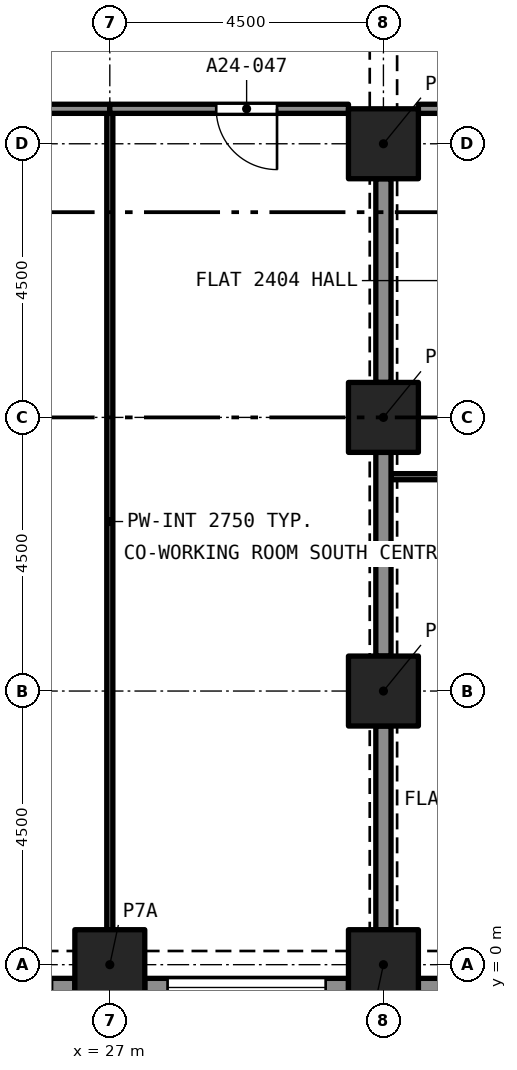
"""IFC4 building model, lengths in metres.
Left out: names, types, materials, properties, quantities, classifications, styles, units other than length and angle.
Written with IfcOpenShell. Run it as: python <this file> out.ifc"""

import sys

from ifc_helpers import new_model, si_unit, direction, frame, frame_2d, origin, origin_2d, place, context, subcontext, project, spatial, rectangle, extrude, element, fill, save


model = new_model("IFC4")
c1 = context("Model", 3, precision=1e-05, world=origin(), true_north=direction((0.0, 1.0)))
c2 = subcontext(c1, "Body", "Model", "MODEL_VIEW")
j1 = project(units=[si_unit("LENGTHUNIT", "METRE"), si_unit("PLANEANGLEUNIT", "RADIAN")], contexts=[c1])
p1 = place(None, origin())
s1 = spatial("IfcSite", under=j1, at=p1, CompositionType="ELEMENT")
p2 = place(p1, origin())
s2 = spatial("IfcBuilding", under=s1, at=p2, CompositionType="ELEMENT")
p3 = place(p2, frame((0.0, 0.0, 89.6)))
s3 = spatial("IfcBuildingStorey", under=s2, at=p3, CompositionType="ELEMENT", Elevation=89.6)
for number, where, z_axis, x_axis in (
    (1, (27.0, 0.0, 0.0), (0.0, 0.0, 1.0), (1.0, 0.0, 0.0)),
    (2, (31.5, 0.0, 0.0), (0.0, 0.0, 1.0), (1.0, 0.0, 0.0)),
    (3, (31.5, 4.5, 0.0), (0.0, 0.0, 1.0), (1.0, 0.0, 0.0)),
    (4, (31.5, 9.0, 0.0), (0.0, 0.0, 1.0), (1.0, 0.0, 0.0)),
    (5, (31.5, 13.5, 0.0), (0.0, 0.0, 1.0), (1.0, 0.0, 0.0)),
):
    element("IfcColumn", number, at=place(p3, frame(where, z_axis=z_axis, x_axis=x_axis)), inside=s3, PredefinedType="COLUMN", context=c2, shape_type="SweptSolid", body=[
        extrude(rectangle(XDim=1.15, YDim=1.15, at=origin_2d()), origin(), (0.0, 0.0, 1.0), 3.2),
    ])
p4 = place(p3, frame((26.425, -0.375, 0.0), z_axis=(0.0, 0.0, 1.0), x_axis=(-1.0, 0.0, 0.0)))
e6 = element("IfcWall", 6, at=p4, inside=s3, PredefinedType="SOLIDWALL", context=c2, shape_type="SweptSolid", body=[
    extrude(rectangle(XDim=3.35, YDim=0.3, at=frame_2d((1.675, 0.0))), origin(), (0.0, 0.0, 1.0), 3.2),
])
p5 = place(p4, frame((0.375, 0.0, 0.45)))
e7 = element("IfcOpeningElement", 7, at=p5, cuts=e6, PredefinedType="OPENING", context=c2, shape_type="SweptSolid", body=[
    extrude(rectangle(XDim=2.6, YDim=1.95, at=frame_2d((1.3, 0.975))), frame((0.0, 0.16, 0.0), z_axis=(0.0, -1.0, 0.0), x_axis=(1.0, 0.0, 0.0)), (0.0, 0.0, 1.0), 0.32),
])
p6 = place(p3, frame((30.925, -0.375, 0.0), z_axis=(0.0, 0.0, 1.0), x_axis=(-1.0, 0.0, 0.0)))
e8 = element("IfcWall", 8, at=p6, inside=s3, PredefinedType="SOLIDWALL", context=c2, shape_type="SweptSolid", body=[
    extrude(rectangle(XDim=3.35, YDim=0.3, at=frame_2d((1.675, 0.0))), origin(), (0.0, 0.0, 1.0), 3.2),
])
p7 = place(p6, frame((0.375, 0.0, 0.45)))
e9 = element("IfcOpeningElement", 9, at=p7, cuts=e8, PredefinedType="OPENING", context=c2, shape_type="SweptSolid", body=[
    extrude(rectangle(XDim=2.6, YDim=1.95, at=frame_2d((1.3, 0.975))), frame((0.0, 0.16, 0.0), z_axis=(0.0, -1.0, 0.0), x_axis=(1.0, 0.0, 0.0)), (0.0, 0.0, 1.0), 0.32),
])
p8 = place(p3, frame((35.425, -0.375, 0.0), z_axis=(0.0, 0.0, 1.0), x_axis=(-1.0, 0.0, 0.0)))
e10 = element("IfcWall", 10, at=p8, inside=s3, PredefinedType="SOLIDWALL", context=c2, shape_type="SweptSolid", body=[
    extrude(rectangle(XDim=3.35, YDim=0.3, at=frame_2d((1.675, 0.0))), origin(), (0.0, 0.0, 1.0), 3.2),
])
p9 = place(p8, frame((0.375, 0.0, 0.45)))
e11 = element("IfcOpeningElement", 11, at=p9, cuts=e10, PredefinedType="OPENING", context=c2, shape_type="SweptSolid", body=[
    extrude(rectangle(XDim=2.6, YDim=1.95, at=frame_2d((1.3, 0.975))), frame((0.0, 0.16, 0.0), z_axis=(0.0, -1.0, 0.0), x_axis=(1.0, 0.0, 0.0)), (0.0, 0.0, 1.0), 0.32),
])
p10 = place(p3, frame((36.0, 8.025, 0.0), z_axis=(0.0, 0.0, 1.0), x_axis=(-1.0, 0.0, 0.0)))
e12 = element("IfcWall", 12, at=p10, inside=s3, PredefinedType="PARTITIONING", context=c2, shape_type="SweptSolid", body=[
    extrude(rectangle(XDim=4.375, YDim=0.1, at=frame_2d((2.188, 0.0))), origin(), (0.0, 0.0, 1.0), 2.9),
])
p11 = place(p10, frame((1.75, 0.0, 0.0)))
e13 = element("IfcOpeningElement", 13, at=p11, cuts=e12, PredefinedType="OPENING", context=c2, shape_type="SweptSolid", body=[
    extrude(rectangle(XDim=1.0, YDim=2.1, at=frame_2d((0.5, 1.05))), frame((0.0, 0.06, 0.0), z_axis=(0.0, -1.0, 0.0), x_axis=(1.0, 0.0, 0.0)), (0.0, 0.0, 1.0), 0.12),
])
p12 = place(p3, frame((31.5, 9.575, 0.0), z_axis=(0.0, 0.0, 1.0), x_axis=(0.0, 1.0, 0.0)))
e14 = element("IfcWall", 14, at=p12, inside=s3, PredefinedType="PARTITIONING", context=c2, shape_type="SweptSolid", body=[
    extrude(rectangle(XDim=3.35, YDim=0.25, at=frame_2d((1.675, 0.0))), origin(), (0.0, 0.0, 1.0), 2.38),
])
p13 = place(p3, frame((34.425, 14.075, 0.0), z_axis=(0.0, 0.0, 1.0), x_axis=(-1.0, 0.0, 0.0)))
e15 = element("IfcWall", 15, at=p13, inside=s3, PredefinedType="PARTITIONING", context=c2, shape_type="SweptSolid", body=[
    extrude(rectangle(XDim=2.35, YDim=0.15, at=frame_2d((1.175, 0.0))), origin(), (0.0, 0.0, 1.0), 2.9),
])
p14 = place(p13, frame((0.175, 0.0, 0.0)))
e16 = element("IfcOpeningElement", 16, at=p14, cuts=e15, PredefinedType="OPENING", context=c2, shape_type="SweptSolid", body=[
    extrude(rectangle(XDim=1.0, YDim=2.1, at=frame_2d((0.5, 1.05))), frame((0.0, 0.085, 0.0), z_axis=(0.0, -1.0, 0.0), x_axis=(1.0, 0.0, 0.0)), (0.0, 0.0, 1.0), 0.17),
])
for number, where, z_axis, x_axis in (
    (17, (31.5, 0.575, 0.0), (0.0, 0.0, 1.0), (0.0, 1.0, 0.0)),
    (18, (31.5, 5.075, 0.0), (0.0, 0.0, 1.0), (0.0, 1.0, 0.0)),
):
    element("IfcWall", number, at=place(p3, frame(where, z_axis=z_axis, x_axis=x_axis)), inside=s3, PredefinedType="PARTITIONING", context=c2, shape_type="SweptSolid", body=[
        extrude(rectangle(XDim=3.35, YDim=0.25, at=frame_2d((1.675, 0.0))), origin(), (0.0, 0.0, 1.0), 2.38),
    ])
p15 = place(p3, frame((27.0, 0.575, 0.0), z_axis=(0.0, 0.0, 1.0), x_axis=(0.0, 1.0, 0.0)))
e19 = element("IfcWall", 19, at=p15, inside=s3, PredefinedType="PARTITIONING", context=c2, shape_type="SweptSolid", body=[
    extrude(rectangle(XDim=13.425, YDim=0.1, at=frame_2d((6.712, 0.0))), origin(), (0.0, 0.0, 1.0), 2.75),
])
p16 = place(p3, frame((27.0, 14.075, 0.0), z_axis=(0.0, 0.0, 1.0), x_axis=(-1.0, 0.0, 0.0)))
e20 = element("IfcWall", 20, at=p16, inside=s3, PredefinedType="PARTITIONING", context=c2, shape_type="SweptSolid", body=[
    extrude(rectangle(XDim=8.425, YDim=0.15, at=frame_2d((4.212, 0.0))), origin(), (0.0, 0.0, 1.0), 2.75),
])
p17 = place(p16, frame((4.0, 0.0, 0.0)))
e21 = element("IfcOpeningElement", 21, at=p17, cuts=e20, PredefinedType="OPENING", context=c2, shape_type="SweptSolid", body=[
    extrude(rectangle(XDim=1.0, YDim=2.1, at=frame_2d((0.5, 1.05))), frame((0.0, 0.085, 0.0), z_axis=(0.0, -1.0, 0.0), x_axis=(1.0, 0.0, 0.0)), (0.0, 0.0, 1.0), 0.17),
])
p18 = place(p3, frame((30.925, 14.075, 0.0), z_axis=(0.0, 0.0, 1.0), x_axis=(-1.0, 0.0, 0.0)))
e22 = element("IfcWall", 22, at=p18, inside=s3, PredefinedType="PARTITIONING", context=c2, shape_type="SweptSolid", body=[
    extrude(rectangle(XDim=3.925, YDim=0.15, at=frame_2d((1.962, 0.0))), origin(), (0.0, 0.0, 1.0), 2.75),
])
p19 = place(p18, frame((1.175, 0.0, 0.0)))
e23 = element("IfcOpeningElement", 23, at=p19, cuts=e22, PredefinedType="OPENING", context=c2, shape_type="SweptSolid", body=[
    extrude(rectangle(XDim=1.0, YDim=2.1, at=frame_2d((0.5, 1.05))), frame((0.0, 0.085, 0.0), z_axis=(0.0, -1.0, 0.0), x_axis=(1.0, 0.0, 0.0)), (0.0, 0.0, 1.0), 0.17),
])
p20 = place(p7, origin())
e24 = element("IfcWindow", 24, at=p20, inside=s3, PartitioningType="SINGLE_PANEL", PredefinedType="WINDOW", context=c2, shape_type="SweptSolid", body=[
    extrude(rectangle(XDim=2.6, YDim=1.95, at=frame_2d((1.3, 0.975))), frame((0.0, 0.03, 0.0), z_axis=(0.0, -1.0, 0.0), x_axis=(1.0, 0.0, 0.0)), (0.0, 0.0, 1.0), 0.06),
])
fill(e9, e24)
p21 = place(p19, origin())
e25 = element("IfcDoor", 25, at=p21, inside=s3, OperationType="SINGLE_SWING_LEFT", PredefinedType="DOOR", context=c2, shape_type="SweptSolid", body=[
    extrude(rectangle(XDim=1.0, YDim=2.1, at=frame_2d((0.5, 1.05))), frame((0.0, 0.025, 0.0), z_axis=(0.0, -1.0, 0.0), x_axis=(1.0, 0.0, 0.0)), (0.0, 0.0, 1.0), 0.05),
])
fill(e23, e25)
save(model, sys.argv[1])
